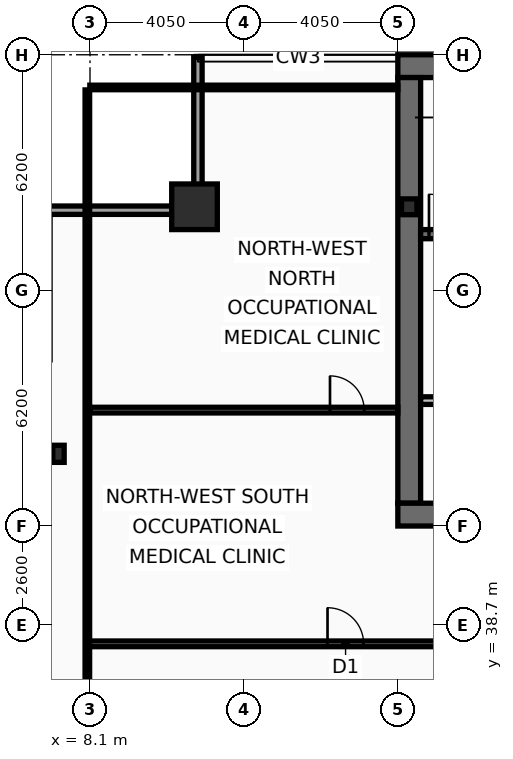
"""IFC4 building model, lengths in metres.
Left out: names, types, materials, properties, quantities, classifications, styles, units other than length and angle.
Written with IfcOpenShell. Run it as: python <this file> out.ifc"""

import sys

from ifc_helpers import new_model, si_unit, direction, frame, frame_2d, origin, origin_2d, place, context, subcontext, project, spatial, rectangle, hollow_rectangle, i_section, extrude, element, fill, save


model = new_model("IFC4")
c1 = context("Model", 3, precision=1e-05, world=origin(), true_north=direction((0.0, 1.0)))
c2 = subcontext(c1, "Body", "Model", "MODEL_VIEW")
j1 = project(units=[si_unit("LENGTHUNIT", "METRE"), si_unit("PLANEANGLEUNIT", "RADIAN")], contexts=[c1])
p1 = place(None, origin())
s1 = spatial("IfcSite", under=j1, at=p1, CompositionType="ELEMENT")
p2 = place(p1, origin())
s2 = spatial("IfcBuilding", under=s1, at=p2, CompositionType="ELEMENT")
p3 = place(p2, frame((0.0, 0.0, 203.0)))
s3 = spatial("IfcBuildingStorey", under=s2, at=p3, CompositionType="ELEMENT", Elevation=203.0)
p4 = place(p3, frame((16.2, 53.4, 0.0), z_axis=(0.0, 0.0, 1.0), x_axis=(1.0, 0.0, 0.0)))
e1 = element("IfcWall", 1, at=p4, inside=s3, PredefinedType="SHEAR", context=c2, shape_type="SweptSolid", body=[
    extrude(rectangle(XDim=40.5, YDim=0.6, at=frame_2d((20.25, 0.0))), origin(), (0.0, 0.0, 1.0), 3.44),
])
p5 = place(p3, frame((16.5, 41.9, 0.0), z_axis=(0.0, 0.0, 1.0), x_axis=(0.0, 1.0, 0.0)))
e2 = element("IfcWall", 2, at=p5, inside=s3, PredefinedType="SHEAR", context=c2, shape_type="SweptSolid", body=[
    extrude(rectangle(XDim=11.2, YDim=0.6, at=frame_2d((5.6, 0.0))), origin(), (0.0, 0.0, 1.0), 3.44),
])
p6 = place(p3, frame((18.65, 41.6, 0.0), z_axis=(0.0, 0.0, 1.0), x_axis=(-1.0, 0.0, 0.0)))
e3 = element("IfcWall", 3, at=p6, inside=s3, PredefinedType="SHEAR", context=c2, shape_type="SweptSolid", body=[
    extrude(rectangle(XDim=2.45, YDim=0.6, at=frame_2d((1.225, 0.0))), origin(), (0.0, 0.0, 1.0), 3.44),
])
p7 = place(p3, frame((16.8, 48.98, 0.0), z_axis=(0.0, 0.0, 1.0), x_axis=(1.0, 0.0, 0.0)))
e4 = element("IfcWall", 4, at=p7, inside=s3, PredefinedType="SHEAR", context=c2, shape_type="SweptSolid", body=[
    extrude(rectangle(XDim=7.42, YDim=0.24, at=frame_2d((3.71, 0.0))), origin(), (0.0, 0.0, 1.0), 3.44),
])
p8 = place(p7, frame((0.22, 0.0, 0.0)))
e5 = element("IfcOpeningElement", 5, at=p8, cuts=e4, PredefinedType="OPENING", context=c2, shape_type="SweptSolid", body=[
    extrude(rectangle(XDim=1.05, YDim=2.15, at=frame_2d((0.525, 1.075))), frame((0.0, 0.13, 0.0), z_axis=(0.0, -1.0, 0.0), x_axis=(1.0, 0.0, 0.0)), (0.0, 0.0, 1.0), 0.26),
])
p9 = place(p3, frame((10.85, 49.7, 0.0), z_axis=(0.0, 0.0, 1.0), x_axis=(1.0, 0.0, 0.0)))
e6 = element("IfcColumn", 6, at=p9, inside=s3, PredefinedType="COLUMN", context=c2, shape_type="SweptSolid", body=[
    extrude(hollow_rectangle(XDim=1.2, YDim=1.2, WallThickness=0.06, at=origin_2d()), origin(), (0.0, 0.0, 1.0), 3.6),
])
p10 = place(p3, frame((7.27, 43.2, 0.0), z_axis=(0.0, 0.0, 1.0), x_axis=(1.0, 0.0, 0.0)))
e7 = element("IfcColumn", 7, at=p10, inside=s3, PredefinedType="COLUMN", context=c2, shape_type="SweptSolid", body=[
    extrude(i_section(OverallWidth=0.3, OverallDepth=0.45, WebThickness=0.014, FlangeThickness=0.026, at=origin_2d()), origin(), (0.0, 0.0, 1.0), 3.6),
])
p11 = place(p3, frame((16.5, 49.7, 0.0), z_axis=(0.0, 0.0, 1.0), x_axis=(1.0, 0.0, 0.0)))
e8 = element("IfcColumn", 8, at=p11, inside=s3, PredefinedType="COLUMN", context=c2, shape_type="SweptSolid", body=[
    extrude(i_section(OverallWidth=0.406, OverallDepth=0.416, WebThickness=0.03, FlangeThickness=0.048, at=origin_2d()), origin(), (0.0, 0.0, 1.0), 3.6),
])
p12 = place(p3, frame((6.83, 49.61, 0.0), z_axis=(0.0, 0.0, 1.0), x_axis=(1.0, 0.0, 0.0)))
e9 = element("IfcWall", 9, at=p12, inside=s3, PredefinedType="SOLIDWALL", context=c2, shape_type="SweptSolid", body=[
    extrude(rectangle(XDim=4.22, YDim=0.22, at=frame_2d((2.11, 0.0))), origin(), (0.0, 0.0, 1.0), 2.83),
])
p13 = place(p3, frame((10.94, 49.72, 0.0), z_axis=(0.0, 0.0, 1.0), x_axis=(0.0, 1.0, 0.0)))
e10 = element("IfcWall", 10, at=p13, inside=s3, PredefinedType="SOLIDWALL", context=c2, shape_type="SweptSolid", body=[
    extrude(rectangle(XDim=3.91, YDim=0.22, at=frame_2d((1.955, 0.0))), origin(), (0.0, 0.0, 1.0), 2.83),
])
p14 = place(p3, frame((16.8, 44.6, 0.0), z_axis=(0.0, 0.0, 1.0), x_axis=(1.0, 0.0, 0.0)))
e11 = element("IfcWall", 11, at=p14, inside=s3, PredefinedType="PARTITIONING", context=c2, shape_type="SweptSolid", body=[
    extrude(rectangle(XDim=4.2, YDim=0.2, at=frame_2d((2.1, 0.0))), origin(), (0.0, 0.0, 1.0), 3.44),
])
p15 = place(p14, frame((1.25, 0.0, 0.0)))
e12 = element("IfcOpeningElement", 12, at=p15, cuts=e11, PredefinedType="OPENING", context=c2, shape_type="SweptSolid", body=[
    extrude(rectangle(XDim=1.05, YDim=2.15, at=frame_2d((0.525, 1.075))), frame((0.0, 0.11, 0.0), z_axis=(0.0, -1.0, 0.0), x_axis=(1.0, 0.0, 0.0)), (0.0, 0.0, 1.0), 0.22),
])
p16 = place(p3, frame((8.03, 38.2, 0.0), z_axis=(0.0, 0.0, 1.0), x_axis=(1.0, 0.0, 0.0)))
e13 = element("IfcWall", 13, at=p16, inside=s3, PredefinedType="PARTITIONING", context=c2, shape_type="SweptSolid", body=[
    extrude(rectangle(XDim=10.52, YDim=0.15, at=frame_2d((5.26, 0.0))), origin(), (0.0, 0.0, 1.0), 2.73),
])
p17 = place(p16, frame((6.32, 0.0, 0.0)))
e14 = element("IfcOpeningElement", 14, at=p17, cuts=e13, PredefinedType="OPENING", context=c2, shape_type="SweptSolid", body=[
    extrude(rectangle(XDim=0.95, YDim=2.05, at=frame_2d((0.475, 1.025))), frame((0.0, 0.085, 0.0), z_axis=(0.0, -1.0, 0.0), x_axis=(1.0, 0.0, 0.0)), (0.0, 0.0, 1.0), 0.17),
])
p18 = place(p3, frame((8.095, 44.35, 0.0), z_axis=(0.0, 0.0, 1.0), x_axis=(1.0, 0.0, 0.0)))
e15 = element("IfcWall", 15, at=p18, inside=s3, PredefinedType="PARTITIONING", context=c2, shape_type="SweptSolid", body=[
    extrude(rectangle(XDim=8.105, YDim=0.15, at=frame_2d((4.052, 0.0))), origin(), (0.0, 0.0, 1.0), 2.83),
])
p19 = place(p18, frame((6.32, 0.0, 0.0)))
e16 = element("IfcOpeningElement", 16, at=p19, cuts=e15, PredefinedType="OPENING", context=c2, shape_type="SweptSolid", body=[
    extrude(rectangle(XDim=0.9, YDim=2.05, at=frame_2d((0.45, 1.025))), frame((0.0, 0.085, 0.0), z_axis=(0.0, -1.0, 0.0), x_axis=(1.0, 0.0, 0.0)), (0.0, 0.0, 1.0), 0.17),
])
p20 = place(p3, frame((8.03, 10.665, 0.0), z_axis=(0.0, 0.0, 1.0), x_axis=(0.0, 1.0, 0.0)))
e17 = element("IfcWall", 17, at=p20, inside=s3, PredefinedType="PARTITIONING", context=c2, shape_type="SweptSolid", body=[
    extrude(rectangle(XDim=42.11, YDim=0.12, at=frame_2d((21.055, 0.0))), origin(), (0.0, 0.0, 1.0), 2.73),
])
p21 = place(p3, frame((8.095, 52.84, 0.0), z_axis=(0.0, 0.0, 1.0), x_axis=(1.0, 0.0, 0.0)))
e18 = element("IfcWall", 18, at=p21, inside=s3, PredefinedType="PARTITIONING", context=c2, shape_type="SweptSolid", body=[
    extrude(rectangle(XDim=8.105, YDim=0.12, at=frame_2d((4.052, 0.0))), origin(), (0.0, 0.0, 1.0), 3.44),
])
p22 = place(p8, origin())
e19 = element("IfcDoor", 19, at=p22, inside=s3, OperationType="SINGLE_SWING_LEFT", PredefinedType="DOOR", context=c2, shape_type="SweptSolid", body=[
    extrude(rectangle(XDim=1.05, YDim=2.15, at=frame_2d((0.525, 1.075))), frame((0.0, 0.025, 0.0), z_axis=(0.0, -1.0, 0.0), x_axis=(1.0, 0.0, 0.0)), (0.0, 0.0, 1.0), 0.05),
])
fill(e5, e19)
p23 = place(p17, origin())
e20 = element("IfcDoor", 20, at=p23, inside=s3, OperationType="SINGLE_SWING_LEFT", PredefinedType="DOOR", context=c2, shape_type="SweptSolid", body=[
    extrude(rectangle(XDim=0.95, YDim=2.05, at=frame_2d((0.475, 1.025))), frame((0.0, 0.025, 0.0), z_axis=(0.0, -1.0, 0.0), x_axis=(1.0, 0.0, 0.0)), (0.0, 0.0, 1.0), 0.05),
])
fill(e14, e20)
p24 = place(p19, origin())
e21 = element("IfcDoor", 21, at=p24, inside=s3, OperationType="SINGLE_SWING_LEFT", PredefinedType="DOOR", context=c2, shape_type="SweptSolid", body=[
    extrude(rectangle(XDim=0.9, YDim=2.05, at=frame_2d((0.45, 1.025))), frame((0.0, 0.025, 0.0), z_axis=(0.0, -1.0, 0.0), x_axis=(1.0, 0.0, 0.0)), (0.0, 0.0, 1.0), 0.05),
])
fill(e16, e21)
save(model, sys.argv[1])
